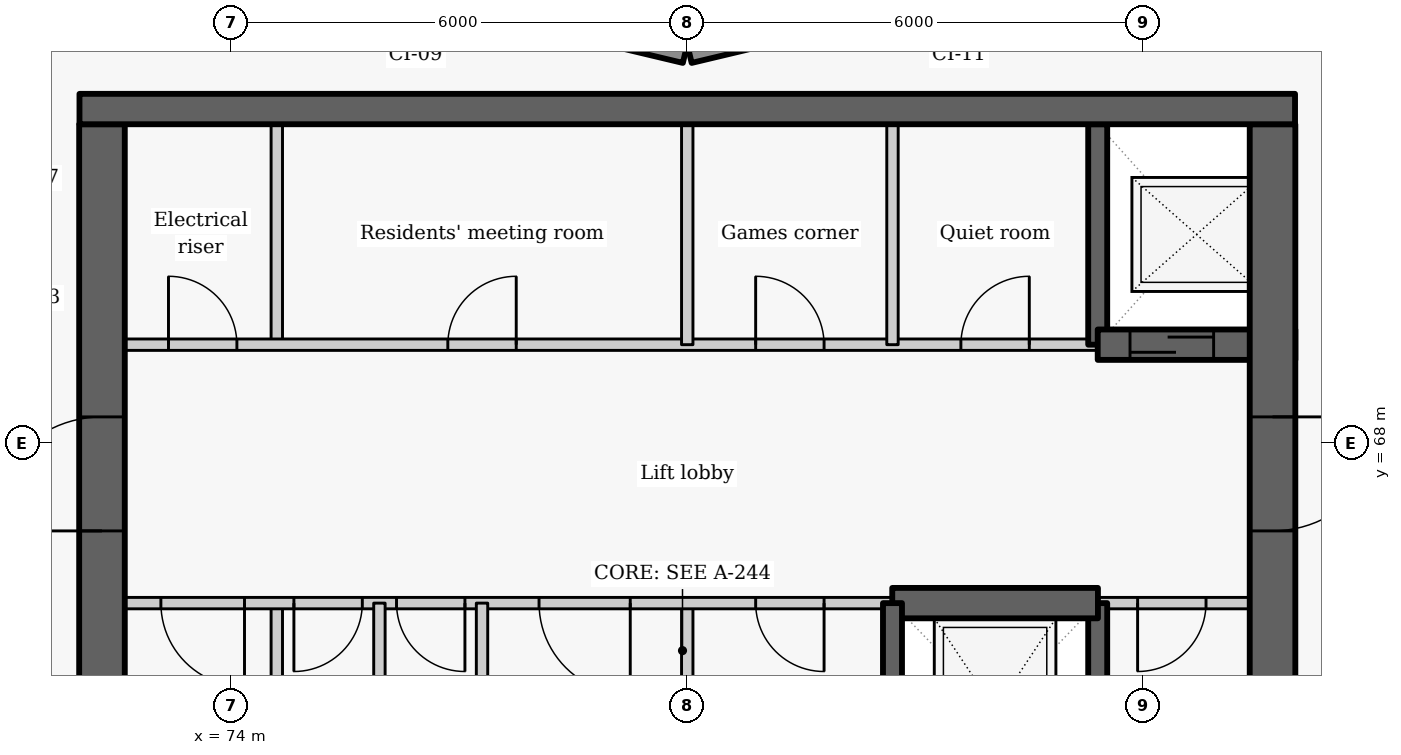
"""IFC4 building model, lengths in metres.
Left out: names, types, materials, properties, quantities, classifications, styles, units other than length and angle.
Written with IfcOpenShell. Run it as: python <this file> out.ifc"""

import sys

from ifc_helpers import new_model, si_unit, direction, frame, frame_2d, origin, place, context, subcontext, project, spatial, rectangle, extrude, element, fill, save


model = new_model("IFC4")
c1 = context("Model", 3, precision=1e-05, world=origin(), true_north=direction((0.0, 1.0)))
c2 = subcontext(c1, "Body", "Model", "MODEL_VIEW")
j1 = project(units=[si_unit("LENGTHUNIT", "METRE"), si_unit("PLANEANGLEUNIT", "RADIAN")], contexts=[c1])
p1 = place(None, origin())
s1 = spatial("IfcSite", under=j1, at=p1, CompositionType="ELEMENT")
p2 = place(p1, origin())
s2 = spatial("IfcBuilding", under=s1, at=p2, CompositionType="ELEMENT")
p3 = place(p2, frame((0.0, 0.0, 269.1)))
s3 = spatial("IfcBuildingStorey", under=s2, at=p3, CompositionType="ELEMENT", Elevation=269.1)
for number, where, z_axis, x_axis in (
    (1, (83.186, 73.881, 0.0), (0.0, 0.0, 1.0), (-0.973, -0.232, 0.0)),
    (2, (79.971, 73.128, 0.0), (0.0, 0.0, 1.0), (-0.973, 0.232, 0.0)),
):
    element("IfcWall", number, at=place(p3, frame(where, z_axis=z_axis, x_axis=x_axis)), inside=s3, PredefinedType="SOLIDWALL", context=c2, shape_type="SweptSolid", body=[
        extrude(rectangle(XDim=3.246, YDim=0.25, at=frame_2d((1.623, 0.0))), origin(), (0.0, 0.0, 1.0), 2.125),
    ])
p4 = place(p3, frame((74.6, 63.1, 0.0), z_axis=(0.0, 0.0, 1.0), x_axis=(0.0, 1.0, 0.0)))
e3 = element("IfcWall", 3, at=p4, inside=s3, PredefinedType="PARTITIONING", context=c2, shape_type="SweptSolid", body=[
    extrude(rectangle(XDim=2.8, YDim=0.15, at=frame_2d((1.4, 0.0))), origin(), (0.0, 0.0, 1.0), 3.025),
])
p5 = place(p3, frame((74.6, 69.3, 0.0), z_axis=(0.0, 0.0, 1.0), x_axis=(0.0, 1.0, 0.0)))
e4 = element("IfcWall", 4, at=p5, inside=s3, PredefinedType="PARTITIONING", context=c2, shape_type="SweptSolid", body=[
    extrude(rectangle(XDim=2.9, YDim=0.15, at=frame_2d((1.45, 0.0))), origin(), (0.0, 0.0, 1.0), 3.025),
])
p6 = place(p3, frame((72.0, 69.3, 0.0), z_axis=(0.0, 0.0, 1.0), x_axis=(1.0, 0.0, 0.0)))
e5 = element("IfcWall", 5, at=p6, inside=s3, PredefinedType="PARTITIONING", context=c2, shape_type="SweptSolid", body=[
    extrude(rectangle(XDim=13.4, YDim=0.15, at=frame_2d((6.7, 0.0))), origin(), (0.0, 0.0, 1.0), 3.025),
])
p7 = place(p6, frame((1.175, 0.0, 0.0)))
e6 = element("IfcOpeningElement", 6, at=p7, cuts=e5, PredefinedType="OPENING", context=c2, shape_type="SweptSolid", body=[
    extrude(rectangle(XDim=0.9, YDim=2.1, at=frame_2d((0.45, 1.05))), frame((0.0, 0.085, 0.0), z_axis=(0.0, -1.0, 0.0), x_axis=(1.0, 0.0, 0.0)), (0.0, 0.0, 1.0), 0.17),
])
p8 = place(p6, frame((4.85, 0.0, 0.0)))
e7 = element("IfcOpeningElement", 7, at=p8, cuts=e5, PredefinedType="OPENING", context=c2, shape_type="SweptSolid", body=[
    extrude(rectangle(XDim=0.9, YDim=2.1, at=frame_2d((0.45, 1.05))), frame((0.0, 0.085, 0.0), z_axis=(0.0, -1.0, 0.0), x_axis=(1.0, 0.0, 0.0)), (0.0, 0.0, 1.0), 0.17),
])
p9 = place(p6, frame((8.9, 0.0, 0.0)))
e8 = element("IfcOpeningElement", 8, at=p9, cuts=e5, PredefinedType="OPENING", context=c2, shape_type="SweptSolid", body=[
    extrude(rectangle(XDim=0.9, YDim=2.1, at=frame_2d((0.45, 1.05))), frame((0.0, 0.085, 0.0), z_axis=(0.0, -1.0, 0.0), x_axis=(1.0, 0.0, 0.0)), (0.0, 0.0, 1.0), 0.17),
])
p10 = place(p6, frame((11.6, 0.0, 0.0)))
e9 = element("IfcOpeningElement", 9, at=p10, cuts=e5, PredefinedType="OPENING", context=c2, shape_type="SweptSolid", body=[
    extrude(rectangle(XDim=0.9, YDim=2.1, at=frame_2d((0.45, 1.05))), frame((0.0, 0.085, 0.0), z_axis=(0.0, -1.0, 0.0), x_axis=(1.0, 0.0, 0.0)), (0.0, 0.0, 1.0), 0.17),
])
p11 = place(p3, frame((72.3, 63.1, -0.275), z_axis=(0.0, 0.0, 1.0), x_axis=(0.0, 1.0, 0.0)))
e10 = element("IfcWall", 10, at=p11, inside=s3, PredefinedType="SHEAR", context=c2, shape_type="SweptSolid", body=[
    extrude(rectangle(XDim=9.1, YDim=0.6, at=frame_2d((4.55, 0.0))), origin(), (0.0, 0.0, 1.0), 3.3),
])
p12 = place(p11, frame((3.75, 0.0, 0.275)))
e11 = element("IfcOpeningElement", 11, at=p12, cuts=e10, PredefinedType="OPENING", context=c2, shape_type="SweptSolid", body=[
    extrude(rectangle(XDim=1.5, YDim=2.1, at=frame_2d((0.75, 1.05))), frame((0.0, 0.31, 0.0), z_axis=(0.0, -1.0, 0.0), x_axis=(1.0, 0.0, 0.0)), (0.0, 0.0, 1.0), 0.62),
])
p13 = place(p3, frame((85.4, 63.1, -0.275), z_axis=(0.0, 0.0, 1.0), x_axis=(0.0, 1.0, 0.0)))
e12 = element("IfcWall", 12, at=p13, inside=s3, PredefinedType="SHEAR", context=c2, shape_type="SweptSolid", body=[
    extrude(rectangle(XDim=2.8, YDim=0.25, at=frame_2d((1.4, 0.0))), origin(), (0.0, 0.0, 1.0), 3.3),
])
p14 = place(p3, frame((85.4, 69.3, -0.275), z_axis=(0.0, 0.0, 1.0), x_axis=(0.0, 1.0, 0.0)))
e13 = element("IfcWall", 13, at=p14, inside=s3, PredefinedType="SHEAR", context=c2, shape_type="SweptSolid", body=[
    extrude(rectangle(XDim=2.9, YDim=0.25, at=frame_2d((1.45, 0.0))), origin(), (0.0, 0.0, 1.0), 3.3),
])
p15 = place(p3, frame((85.4, 69.3, -0.275), z_axis=(0.0, 0.0, 1.0), x_axis=(1.0, 0.0, 0.0)))
e14 = element("IfcWall", 14, at=p15, inside=s3, PredefinedType="SHEAR", context=c2, shape_type="SweptSolid", body=[
    extrude(rectangle(XDim=2.6, YDim=0.4, at=frame_2d((1.3, 0.0))), origin(), (0.0, 0.0, 1.0), 3.3),
])
p16 = place(p15, frame((0.425, 0.0, 0.275)))
e15 = element("IfcOpeningElement", 15, at=p16, cuts=e14, PredefinedType="OPENING", context=c2, shape_type="SweptSolid", body=[
    extrude(rectangle(XDim=1.1, YDim=2.1, at=frame_2d((0.55, 1.05))), frame((0.0, 0.21, 0.0), z_axis=(0.0, -1.0, 0.0), x_axis=(1.0, 0.0, 0.0)), (0.0, 0.0, 1.0), 0.42),
])
p17 = place(p3, frame((87.7, 72.2, -0.275), z_axis=(0.0, 0.0, 1.0), x_axis=(0.0, -1.0, 0.0)))
e16 = element("IfcWall", 16, at=p17, inside=s3, PredefinedType="SHEAR", context=c2, shape_type="SweptSolid", body=[
    extrude(rectangle(XDim=14.25, YDim=0.6, at=frame_2d((7.125, 0.0))), origin(), (0.0, 0.0, 1.0), 3.3),
])
p18 = place(p17, frame((3.85, 0.0, 0.275)))
e17 = element("IfcOpeningElement", 17, at=p18, cuts=e16, PredefinedType="OPENING", context=c2, shape_type="SweptSolid", body=[
    extrude(rectangle(XDim=1.5, YDim=2.1, at=frame_2d((0.75, 1.05))), frame((0.0, 0.31, 0.0), z_axis=(0.0, -1.0, 0.0), x_axis=(1.0, 0.0, 0.0)), (0.0, 0.0, 1.0), 0.62),
])
p19 = place(p17, frame((11.125, 0.0, 0.275)))
e18 = element("IfcOpeningElement", 18, at=p19, cuts=e16, PredefinedType="OPENING", context=c2, shape_type="SweptSolid", body=[
    extrude(rectangle(XDim=1.1, YDim=2.1, at=frame_2d((0.55, 1.05))), frame((0.0, 0.31, 0.0), z_axis=(0.0, -1.0, 0.0), x_axis=(1.0, 0.0, 0.0)), (0.0, 0.0, 1.0), 0.62),
])
p20 = place(p3, frame((80.0, 63.1, 0.0), z_axis=(0.0, 0.0, 1.0), x_axis=(0.0, 1.0, 0.0)))
e19 = element("IfcWall", 19, at=p20, inside=s3, PredefinedType="PARTITIONING", context=c2, shape_type="SweptSolid", body=[
    extrude(rectangle(XDim=2.8, YDim=0.15, at=frame_2d((1.4, 0.0))), origin(), (0.0, 0.0, 1.0), 3.025),
])
for number, where, z_axis, x_axis in (
    (20, (80.0, 69.3, 0.0), (0.0, 0.0, 1.0), (0.0, 1.0, 0.0)),
    (21, (82.7, 69.3, 0.0), (0.0, 0.0, 1.0), (0.0, 1.0, 0.0)),
):
    element("IfcWall", number, at=place(p3, frame(where, z_axis=z_axis, x_axis=x_axis)), inside=s3, PredefinedType="PARTITIONING", context=c2, shape_type="SweptSolid", body=[
        extrude(rectangle(XDim=2.9, YDim=0.15, at=frame_2d((1.45, 0.0))), origin(), (0.0, 0.0, 1.0), 3.025),
    ])
p21 = place(p3, frame((82.703, 65.9, 0.0), z_axis=(0.0, 0.0, 1.0), x_axis=(-1.0, 0.0, 0.0)))
e22 = element("IfcWall", 22, at=p21, inside=s3, PredefinedType="PARTITIONING", context=c2, shape_type="SweptSolid", body=[
    extrude(rectangle(XDim=10.703, YDim=0.15, at=frame_2d((5.352, 0.0))), origin(), (0.0, 0.0, 1.0), 3.025),
])
p22 = place(p21, frame((8.528, 0.0, 0.0)))
e23 = element("IfcOpeningElement", 23, at=p22, cuts=e22, PredefinedType="OPENING", context=c2, shape_type="SweptSolid", body=[
    extrude(rectangle(XDim=1.1, YDim=2.1, at=frame_2d((0.55, 1.05))), frame((0.0, 0.085, 0.0), z_axis=(0.0, -1.0, 0.0), x_axis=(1.0, 0.0, 0.0)), (0.0, 0.0, 1.0), 0.17),
])
p23 = place(p21, frame((6.978, 0.0, 0.0)))
e24 = element("IfcOpeningElement", 24, at=p23, cuts=e22, PredefinedType="OPENING", context=c2, shape_type="SweptSolid", body=[
    extrude(rectangle(XDim=0.9, YDim=2.1, at=frame_2d((0.45, 1.05))), frame((0.0, 0.085, 0.0), z_axis=(0.0, -1.0, 0.0), x_axis=(1.0, 0.0, 0.0)), (0.0, 0.0, 1.0), 0.17),
])
p24 = place(p21, frame((5.628, 0.0, 0.0)))
e25 = element("IfcOpeningElement", 25, at=p24, cuts=e22, PredefinedType="OPENING", context=c2, shape_type="SweptSolid", body=[
    extrude(rectangle(XDim=0.9, YDim=2.1, at=frame_2d((0.45, 1.05))), frame((0.0, 0.085, 0.0), z_axis=(0.0, -1.0, 0.0), x_axis=(1.0, 0.0, 0.0)), (0.0, 0.0, 1.0), 0.17),
])
p25 = place(p21, frame((3.453, 0.0, 0.0)))
e26 = element("IfcOpeningElement", 26, at=p25, cuts=e22, PredefinedType="OPENING", context=c2, shape_type="SweptSolid", body=[
    extrude(rectangle(XDim=1.2, YDim=2.1, at=frame_2d((0.6, 1.05))), frame((0.0, 0.085, 0.0), z_axis=(0.0, -1.0, 0.0), x_axis=(1.0, 0.0, 0.0)), (0.0, 0.0, 1.0), 0.17),
])
p26 = place(p21, frame((0.903, 0.0, 0.0)))
e27 = element("IfcOpeningElement", 27, at=p26, cuts=e22, PredefinedType="OPENING", context=c2, shape_type="SweptSolid", body=[
    extrude(rectangle(XDim=0.9, YDim=2.1, at=frame_2d((0.45, 1.05))), frame((0.0, 0.085, 0.0), z_axis=(0.0, -1.0, 0.0), x_axis=(1.0, 0.0, 0.0)), (0.0, 0.0, 1.0), 0.17),
])
p27 = place(p3, frame((88.0, 65.9, 0.0), z_axis=(0.0, 0.0, 1.0), x_axis=(-1.0, 0.0, 0.0)))
e28 = element("IfcWall", 28, at=p27, inside=s3, PredefinedType="PARTITIONING", context=c2, shape_type="SweptSolid", body=[
    extrude(rectangle(XDim=2.603, YDim=0.15, at=frame_2d((1.302, 0.0))), origin(), (0.0, 0.0, 1.0), 3.025),
])
p28 = place(p27, frame((1.175, 0.0, 0.0)))
e29 = element("IfcOpeningElement", 29, at=p28, cuts=e28, PredefinedType="OPENING", context=c2, shape_type="SweptSolid", body=[
    extrude(rectangle(XDim=0.9, YDim=2.1, at=frame_2d((0.45, 1.05))), frame((0.0, 0.085, 0.0), z_axis=(0.0, -1.0, 0.0), x_axis=(1.0, 0.0, 0.0)), (0.0, 0.0, 1.0), 0.17),
])
p29 = place(p3, frame((82.697, 65.9, -0.275), z_axis=(0.0, 0.0, 1.0), x_axis=(1.0, 0.0, 0.0)))
e30 = element("IfcWall", 30, at=p29, inside=s3, PredefinedType="SHEAR", context=c2, shape_type="SweptSolid", body=[
    extrude(rectangle(XDim=2.706, YDim=0.4, at=frame_2d((1.353, 0.0))), origin(), (0.0, 0.0, 1.0), 3.3),
])
for number, where, z_axis, x_axis in (
    (31, (75.95, 63.1, 0.0), (0.0, 0.0, 1.0), (0.0, 1.0, 0.0)),
    (32, (77.3, 63.1, 0.0), (0.0, 0.0, 1.0), (0.0, 1.0, 0.0)),
):
    element("IfcWall", number, at=place(p3, frame(where, z_axis=z_axis, x_axis=x_axis)), inside=s3, PredefinedType="PARTITIONING", context=c2, shape_type="SweptSolid", body=[
        extrude(rectangle(XDim=2.8, YDim=0.15, at=frame_2d((1.4, 0.0))), origin(), (0.0, 0.0, 1.0), 3.025),
    ])
p30 = place(p3, frame((82.7, 63.1, -0.275), z_axis=(0.0, 0.0, 1.0), x_axis=(0.0, 1.0, 0.0)))
e33 = element("IfcWall", 33, at=p30, inside=s3, PredefinedType="SHEAR", context=c2, shape_type="SweptSolid", body=[
    extrude(rectangle(XDim=2.8, YDim=0.25, at=frame_2d((1.4, 0.0))), origin(), (0.0, 0.0, 1.0), 3.3),
])
p31 = place(p3, frame((72.004, 72.4, -0.275), z_axis=(0.0, 0.0, 1.0), x_axis=(1.0, 0.0, 0.0)))
e34 = element("IfcWall", 34, at=p31, inside=s3, PredefinedType="SHEAR", context=c2, shape_type="SweptSolid", body=[
    extrude(rectangle(XDim=15.992, YDim=0.4, at=frame_2d((7.996, 0.0))), origin(), (0.0, 0.0, 1.0), 3.3),
])
p32 = place(p7, origin())
e35 = element("IfcDoor", 35, at=p32, inside=s3, OperationType="SINGLE_SWING_LEFT", PredefinedType="DOOR", context=c2, shape_type="SweptSolid", body=[
    extrude(rectangle(XDim=0.9, YDim=2.1, at=frame_2d((0.45, 1.05))), frame((0.0, 0.025, 0.0), z_axis=(0.0, -1.0, 0.0), x_axis=(1.0, 0.0, 0.0)), (0.0, 0.0, 1.0), 0.05),
])
fill(e6, e35)
p33 = place(p16, origin())
e36 = element("IfcDoor", 36, at=p33, inside=s3, OperationType="SLIDING_TO_LEFT", PredefinedType="DOOR", context=c2, shape_type="SweptSolid", body=[
    extrude(rectangle(XDim=1.1, YDim=2.1, at=frame_2d((0.55, 1.05))), frame((0.0, 0.025, 0.0), z_axis=(0.0, -1.0, 0.0), x_axis=(1.0, 0.0, 0.0)), (0.0, 0.0, 1.0), 0.05),
])
fill(e15, e36)
p34 = place(p8, origin())
e37 = element("IfcDoor", 37, at=p34, inside=s3, OperationType="SINGLE_SWING_RIGHT", PredefinedType="DOOR", context=c2, shape_type="SweptSolid", body=[
    extrude(rectangle(XDim=0.9, YDim=2.1, at=frame_2d((0.45, 1.05))), frame((0.0, 0.025, 0.0), z_axis=(0.0, -1.0, 0.0), x_axis=(1.0, 0.0, 0.0)), (0.0, 0.0, 1.0), 0.05),
])
fill(e7, e37)
p35 = place(p9, origin())
e38 = element("IfcDoor", 38, at=p35, inside=s3, OperationType="SINGLE_SWING_LEFT", PredefinedType="DOOR", context=c2, shape_type="SweptSolid", body=[
    extrude(rectangle(XDim=0.9, YDim=2.1, at=frame_2d((0.45, 1.05))), frame((0.0, 0.025, 0.0), z_axis=(0.0, -1.0, 0.0), x_axis=(1.0, 0.0, 0.0)), (0.0, 0.0, 1.0), 0.05),
])
fill(e8, e38)
p36 = place(p10, origin())
e39 = element("IfcDoor", 39, at=p36, inside=s3, OperationType="SINGLE_SWING_RIGHT", PredefinedType="DOOR", context=c2, shape_type="SweptSolid", body=[
    extrude(rectangle(XDim=0.9, YDim=2.1, at=frame_2d((0.45, 1.05))), frame((0.0, 0.025, 0.0), z_axis=(0.0, -1.0, 0.0), x_axis=(1.0, 0.0, 0.0)), (0.0, 0.0, 1.0), 0.05),
])
fill(e9, e39)
p37 = place(p22, origin())
e40 = element("IfcDoor", 40, at=p37, inside=s3, OperationType="SINGLE_SWING_LEFT", PredefinedType="DOOR", context=c2, shape_type="SweptSolid", body=[
    extrude(rectangle(XDim=1.1, YDim=2.1, at=frame_2d((0.55, 1.05))), frame((0.0, 0.025, 0.0), z_axis=(0.0, -1.0, 0.0), x_axis=(1.0, 0.0, 0.0)), (0.0, 0.0, 1.0), 0.05),
])
fill(e23, e40)
p38 = place(p23, origin())
e41 = element("IfcDoor", 41, at=p38, inside=s3, OperationType="SINGLE_SWING_RIGHT", PredefinedType="DOOR", context=c2, shape_type="SweptSolid", body=[
    extrude(rectangle(XDim=0.9, YDim=2.1, at=frame_2d((0.45, 1.05))), frame((0.0, 0.025, 0.0), z_axis=(0.0, -1.0, 0.0), x_axis=(1.0, 0.0, 0.0)), (0.0, 0.0, 1.0), 0.05),
])
fill(e24, e41)
p39 = place(p24, origin())
e42 = element("IfcDoor", 42, at=p39, inside=s3, OperationType="SINGLE_SWING_LEFT", PredefinedType="DOOR", context=c2, shape_type="SweptSolid", body=[
    extrude(rectangle(XDim=0.9, YDim=2.1, at=frame_2d((0.45, 1.05))), frame((0.0, 0.025, 0.0), z_axis=(0.0, -1.0, 0.0), x_axis=(1.0, 0.0, 0.0)), (0.0, 0.0, 1.0), 0.05),
])
fill(e25, e42)
p40 = place(p25, origin())
e43 = element("IfcDoor", 43, at=p40, inside=s3, OperationType="DOUBLE_DOOR_SINGLE_SWING", PredefinedType="DOOR", context=c2, shape_type="SweptSolid", body=[
    extrude(rectangle(XDim=1.2, YDim=2.1, at=frame_2d((0.6, 1.05))), frame((0.0, 0.025, 0.0), z_axis=(0.0, -1.0, 0.0), x_axis=(1.0, 0.0, 0.0)), (0.0, 0.0, 1.0), 0.05),
])
fill(e26, e43)
p41 = place(p26, origin())
e44 = element("IfcDoor", 44, at=p41, inside=s3, OperationType="SINGLE_SWING_LEFT", PredefinedType="DOOR", context=c2, shape_type="SweptSolid", body=[
    extrude(rectangle(XDim=0.9, YDim=2.1, at=frame_2d((0.45, 1.05))), frame((0.0, 0.025, 0.0), z_axis=(0.0, -1.0, 0.0), x_axis=(1.0, 0.0, 0.0)), (0.0, 0.0, 1.0), 0.05),
])
fill(e27, e44)
p42 = place(p28, origin())
e45 = element("IfcDoor", 45, at=p42, inside=s3, OperationType="SINGLE_SWING_RIGHT", PredefinedType="DOOR", context=c2, shape_type="SweptSolid", body=[
    extrude(rectangle(XDim=0.9, YDim=2.1, at=frame_2d((0.45, 1.05))), frame((0.0, 0.025, 0.0), z_axis=(0.0, -1.0, 0.0), x_axis=(1.0, 0.0, 0.0)), (0.0, 0.0, 1.0), 0.05),
])
fill(e29, e45)
p43 = place(p18, origin())
e46 = element("IfcDoor", 46, at=p43, inside=s3, OperationType="DOUBLE_DOOR_SINGLE_SWING", PredefinedType="DOOR", context=c2, shape_type="SweptSolid", body=[
    extrude(rectangle(XDim=1.5, YDim=2.1, at=frame_2d((0.75, 1.05))), frame((0.0, 0.025, 0.0), z_axis=(0.0, -1.0, 0.0), x_axis=(1.0, 0.0, 0.0)), (0.0, 0.0, 1.0), 0.05),
])
fill(e17, e46)
p44 = place(p12, origin())
e47 = element("IfcDoor", 47, at=p44, inside=s3, OperationType="DOUBLE_DOOR_SINGLE_SWING", PredefinedType="DOOR", context=c2, shape_type="SweptSolid", body=[
    extrude(rectangle(XDim=1.5, YDim=2.1, at=frame_2d((0.75, 1.05))), frame((0.0, 0.025, 0.0), z_axis=(0.0, -1.0, 0.0), x_axis=(1.0, 0.0, 0.0)), (0.0, 0.0, 1.0), 0.05),
])
fill(e11, e47)
save(model, sys.argv[1])
